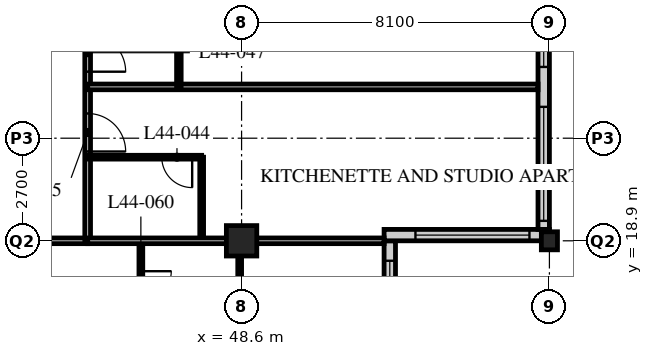
"""IFC4 building model, lengths in metres.
Left out: names, types, materials, properties, quantities, classifications, styles, units other than length and angle.
Written with IfcOpenShell. Run it as: python <this file> out.ifc"""

import sys

from ifc_helpers import new_model, si_unit, direction, frame, frame_2d, origin, origin_2d, place, context, subcontext, project, spatial, rectangle, hollow_rectangle, i_section, extrude, element, fill, save


model = new_model("IFC4")
c1 = context("Model", 3, precision=1e-05, world=origin(), true_north=direction((0.0, 1.0)))
c2 = subcontext(c1, "Body", "Model", "MODEL_VIEW")
j1 = project(units=[si_unit("LENGTHUNIT", "METRE"), si_unit("PLANEANGLEUNIT", "RADIAN")], contexts=[c1])
p1 = place(None, origin())
s1 = spatial("IfcSite", under=j1, at=p1, CompositionType="ELEMENT")
p2 = place(p1, origin())
s2 = spatial("IfcBuilding", under=s1, at=p2, CompositionType="ELEMENT")
p3 = place(p2, frame((0.0, 0.0, 174.0)))
s3 = spatial("IfcBuildingStorey", under=s2, at=p3, CompositionType="ELEMENT", Elevation=174.0)
p4 = place(p3, frame((48.6, 18.9, 0.0), z_axis=(0.0, 0.0, 1.0), x_axis=(1.0, 0.0, 0.0)))
e1 = element("IfcColumn", 1, at=p4, inside=s3, PredefinedType="COLUMN", context=c2, shape_type="SweptSolid", body=[
    extrude(hollow_rectangle(XDim=0.8, YDim=0.8, WallThickness=0.08, at=origin_2d()), origin(), (0.0, 0.0, 1.0), 3.6),
])
p5 = place(p3, frame((56.7, 18.9, 0.0), z_axis=(0.0, 0.0, 1.0), x_axis=(1.0, 0.0, 0.0)))
e2 = element("IfcColumn", 2, at=p5, inside=s3, PredefinedType="COLUMN", context=c2, shape_type="SweptSolid", body=[
    extrude(i_section(OverallWidth=0.424, OverallDepth=0.475, WebThickness=0.048, FlangeThickness=0.077, FilletRadius=0.015, at=origin_2d()), origin(), (0.0, 0.0, 1.0), 3.6),
])
p6 = place(p3, frame((52.5, 15.15, 0.0), z_axis=(0.0, 0.0, 1.0), x_axis=(0.0, 1.0, 0.0)))
e3 = element("IfcWall", 3, at=p6, inside=s3, PredefinedType="SOLIDWALL", context=c2, shape_type="SweptSolid", body=[
    extrude(rectangle(XDim=3.75, YDim=0.3, at=frame_2d((1.875, 0.0))), origin(), (0.0, 0.0, 1.0), 3.39),
])
p7 = place(p6, frame((0.225, 0.0, 0.6)))
e4 = element("IfcOpeningElement", 4, at=p7, cuts=e3, PredefinedType="OPENING", context=c2, shape_type="SweptSolid", body=[
    extrude(rectangle(XDim=3.0, YDim=2.0, at=frame_2d((1.5, 1.0))), frame((0.0, 0.16, 0.0), z_axis=(0.0, -1.0, 0.0), x_axis=(1.0, 0.0, 0.0)), (0.0, 0.0, 1.0), 0.32),
])
p8 = place(p3, frame((52.35, 19.05, 0.0), z_axis=(0.0, 0.0, 1.0), x_axis=(1.0, 0.0, 0.0)))
e5 = element("IfcWall", 5, at=p8, inside=s3, PredefinedType="SOLIDWALL", context=c2, shape_type="SweptSolid", body=[
    extrude(rectangle(XDim=4.35, YDim=0.3, at=frame_2d((2.175, 0.0))), origin(), (0.0, 0.0, 1.0), 3.39),
])
p9 = place(p8, frame((0.825, 0.0, 0.6)))
e6 = element("IfcOpeningElement", 6, at=p9, cuts=e5, PredefinedType="OPENING", context=c2, shape_type="SweptSolid", body=[
    extrude(rectangle(XDim=3.0, YDim=2.0, at=frame_2d((1.5, 1.0))), frame((0.0, 0.16, 0.0), z_axis=(0.0, -1.0, 0.0), x_axis=(1.0, 0.0, 0.0)), (0.0, 0.0, 1.0), 0.32),
])
p10 = place(p3, frame((56.55, 19.2, 0.0), z_axis=(0.0, 0.0, 1.0), x_axis=(0.0, 1.0, 0.0)))
e7 = element("IfcWall", 7, at=p10, inside=s3, PredefinedType="SOLIDWALL", context=c2, shape_type="SweptSolid", body=[
    extrude(rectangle(XDim=32.1, YDim=0.3, at=frame_2d((16.05, 0.0))), origin(), (0.0, 0.0, 1.0), 3.39),
])
p11 = place(p10, frame((0.225, 0.0, 0.6)))
e8 = element("IfcOpeningElement", 8, at=p11, cuts=e7, PredefinedType="OPENING", context=c2, shape_type="SweptSolid", body=[
    extrude(rectangle(XDim=3.0, YDim=2.4, at=frame_2d((1.5, 1.2))), frame((0.0, 0.16, 0.0), z_axis=(0.0, -1.0, 0.0), x_axis=(1.0, 0.0, 0.0)), (0.0, 0.0, 1.0), 0.32),
])
p12 = place(p10, frame((4.275, 0.0, 0.6)))
e9 = element("IfcOpeningElement", 9, at=p12, cuts=e7, PredefinedType="OPENING", context=c2, shape_type="SweptSolid", body=[
    extrude(rectangle(XDim=3.0, YDim=2.4, at=frame_2d((1.5, 1.2))), frame((0.0, 0.16, 0.0), z_axis=(0.0, -1.0, 0.0), x_axis=(1.0, 0.0, 0.0)), (0.0, 0.0, 1.0), 0.32),
])
p13 = place(p10, frame((8.325, 0.0, 0.6)))
e10 = element("IfcOpeningElement", 10, at=p13, cuts=e7, PredefinedType="OPENING", context=c2, shape_type="SweptSolid", body=[
    extrude(rectangle(XDim=3.0, YDim=2.4, at=frame_2d((1.5, 1.2))), frame((0.0, 0.16, 0.0), z_axis=(0.0, -1.0, 0.0), x_axis=(1.0, 0.0, 0.0)), (0.0, 0.0, 1.0), 0.32),
])
p14 = place(p10, frame((12.375, 0.0, 0.6)))
e11 = element("IfcOpeningElement", 11, at=p14, cuts=e7, PredefinedType="OPENING", context=c2, shape_type="SweptSolid", body=[
    extrude(rectangle(XDim=3.0, YDim=2.4, at=frame_2d((1.5, 1.2))), frame((0.0, 0.16, 0.0), z_axis=(0.0, -1.0, 0.0), x_axis=(1.0, 0.0, 0.0)), (0.0, 0.0, 1.0), 0.32),
])
p15 = place(p10, frame((16.425, 0.0, 0.6)))
e12 = element("IfcOpeningElement", 12, at=p15, cuts=e7, PredefinedType="OPENING", context=c2, shape_type="SweptSolid", body=[
    extrude(rectangle(XDim=3.0, YDim=2.4, at=frame_2d((1.5, 1.2))), frame((0.0, 0.16, 0.0), z_axis=(0.0, -1.0, 0.0), x_axis=(1.0, 0.0, 0.0)), (0.0, 0.0, 1.0), 0.32),
])
p16 = place(p10, frame((20.475, 0.0, 0.6)))
e13 = element("IfcOpeningElement", 13, at=p16, cuts=e7, PredefinedType="OPENING", context=c2, shape_type="SweptSolid", body=[
    extrude(rectangle(XDim=3.0, YDim=2.4, at=frame_2d((1.5, 1.2))), frame((0.0, 0.16, 0.0), z_axis=(0.0, -1.0, 0.0), x_axis=(1.0, 0.0, 0.0)), (0.0, 0.0, 1.0), 0.32),
])
p17 = place(p10, frame((24.525, 0.0, 0.6)))
e14 = element("IfcOpeningElement", 14, at=p17, cuts=e7, PredefinedType="OPENING", context=c2, shape_type="SweptSolid", body=[
    extrude(rectangle(XDim=3.0, YDim=2.4, at=frame_2d((1.5, 1.2))), frame((0.0, 0.16, 0.0), z_axis=(0.0, -1.0, 0.0), x_axis=(1.0, 0.0, 0.0)), (0.0, 0.0, 1.0), 0.32),
])
p18 = place(p10, frame((28.575, 0.0, 0.6)))
e15 = element("IfcOpeningElement", 15, at=p18, cuts=e7, PredefinedType="OPENING", context=c2, shape_type="SweptSolid", body=[
    extrude(rectangle(XDim=3.0, YDim=2.4, at=frame_2d((1.5, 1.2))), frame((0.0, 0.16, 0.0), z_axis=(0.0, -1.0, 0.0), x_axis=(1.0, 0.0, 0.0)), (0.0, 0.0, 1.0), 0.32),
])
p19 = place(p3, frame((12.15, 18.9, 0.0), z_axis=(0.0, 0.0, 1.0), x_axis=(1.0, 0.0, 0.0)))
e16 = element("IfcWall", 16, at=p19, inside=s3, PredefinedType="PARTITIONING", context=c2, shape_type="SweptSolid", body=[
    extrude(rectangle(XDim=32.4, YDim=0.15, at=frame_2d((16.2, 0.0))), origin(), (0.0, 0.0, 1.0), 2.778),
])
p20 = place(p19, frame((6.4, 0.0, 0.0)))
e17 = element("IfcOpeningElement", 17, at=p20, cuts=e16, PredefinedType="OPENING", context=c2, shape_type="SweptSolid", body=[
    extrude(rectangle(XDim=1.0, YDim=2.1, at=frame_2d((0.5, 1.05))), frame((0.0, 0.085, 0.0), z_axis=(0.0, -1.0, 0.0), x_axis=(1.0, 0.0, 0.0)), (0.0, 0.0, 1.0), 0.17),
])
p21 = place(p19, frame((8.8, 0.0, 0.0)))
e18 = element("IfcOpeningElement", 18, at=p21, cuts=e16, PredefinedType="OPENING", context=c2, shape_type="SweptSolid", body=[
    extrude(rectangle(XDim=1.0, YDim=2.1, at=frame_2d((0.5, 1.05))), frame((0.0, 0.085, 0.0), z_axis=(0.0, -1.0, 0.0), x_axis=(1.0, 0.0, 0.0)), (0.0, 0.0, 1.0), 0.17),
])
p22 = place(p19, frame((13.05, 0.0, 0.0)))
e19 = element("IfcOpeningElement", 19, at=p22, cuts=e16, PredefinedType="OPENING", context=c2, shape_type="SweptSolid", body=[
    extrude(rectangle(XDim=1.0, YDim=2.1, at=frame_2d((0.5, 1.05))), frame((0.0, 0.085, 0.0), z_axis=(0.0, -1.0, 0.0), x_axis=(1.0, 0.0, 0.0)), (0.0, 0.0, 1.0), 0.17),
])
p23 = place(p19, frame((22.6, 0.0, 0.0)))
e20 = element("IfcOpeningElement", 20, at=p23, cuts=e16, PredefinedType="OPENING", context=c2, shape_type="SweptSolid", body=[
    extrude(rectangle(XDim=1.0, YDim=2.1, at=frame_2d((0.5, 1.05))), frame((0.0, 0.085, 0.0), z_axis=(0.0, -1.0, 0.0), x_axis=(1.0, 0.0, 0.0)), (0.0, 0.0, 1.0), 0.17),
])
p24 = place(p19, frame((25.0, 0.0, 0.0)))
e21 = element("IfcOpeningElement", 21, at=p24, cuts=e16, PredefinedType="OPENING", context=c2, shape_type="SweptSolid", body=[
    extrude(rectangle(XDim=1.0, YDim=2.1, at=frame_2d((0.5, 1.05))), frame((0.0, 0.085, 0.0), z_axis=(0.0, -1.0, 0.0), x_axis=(1.0, 0.0, 0.0)), (0.0, 0.0, 1.0), 0.17),
])
p25 = place(p19, frame((1.525, 0.0, 0.0)))
e22 = element("IfcOpeningElement", 22, at=p25, cuts=e16, PredefinedType="OPENING", context=c2, shape_type="SweptSolid", body=[
    extrude(rectangle(XDim=1.0, YDim=2.1, at=frame_2d((0.5, 1.05))), frame((0.0, 0.085, 0.0), z_axis=(0.0, -1.0, 0.0), x_axis=(1.0, 0.0, 0.0)), (0.0, 0.0, 1.0), 0.17),
])
p26 = place(p19, frame((29.875, 0.0, 0.0)))
e23 = element("IfcOpeningElement", 23, at=p26, cuts=e16, PredefinedType="OPENING", context=c2, shape_type="SweptSolid", body=[
    extrude(rectangle(XDim=1.0, YDim=2.1, at=frame_2d((0.5, 1.05))), frame((0.0, 0.085, 0.0), z_axis=(0.0, -1.0, 0.0), x_axis=(1.0, 0.0, 0.0)), (0.0, 0.0, 1.0), 0.17),
])
p27 = place(p3, frame((44.55, 18.9, 0.0), z_axis=(0.0, 0.0, 1.0), x_axis=(0.0, 1.0, 0.0)))
e24 = element("IfcWall", 24, at=p27, inside=s3, PredefinedType="PARTITIONING", context=c2, shape_type="SweptSolid", body=[
    extrude(rectangle(XDim=24.3, YDim=0.15, at=frame_2d((12.15, 0.0))), origin(), (0.0, 0.0, 1.0), 3.39),
])
p28 = place(p27, frame((2.35, 0.0, 0.0)))
e25 = element("IfcOpeningElement", 25, at=p28, cuts=e24, PredefinedType="OPENING", context=c2, shape_type="SweptSolid", body=[
    extrude(rectangle(XDim=1.0, YDim=2.1, at=frame_2d((0.5, 1.05))), frame((0.0, 0.085, 0.0), z_axis=(0.0, -1.0, 0.0), x_axis=(1.0, 0.0, 0.0)), (0.0, 0.0, 1.0), 0.17),
])
p29 = place(p27, frame((4.45, 0.0, 0.0)))
e26 = element("IfcOpeningElement", 26, at=p29, cuts=e24, PredefinedType="OPENING", context=c2, shape_type="SweptSolid", body=[
    extrude(rectangle(XDim=1.0, YDim=2.1, at=frame_2d((0.5, 1.05))), frame((0.0, 0.085, 0.0), z_axis=(0.0, -1.0, 0.0), x_axis=(1.0, 0.0, 0.0)), (0.0, 0.0, 1.0), 0.17),
])
p30 = place(p27, frame((18.55, 0.0, 0.0)))
e27 = element("IfcOpeningElement", 27, at=p30, cuts=e24, PredefinedType="OPENING", context=c2, shape_type="SweptSolid", body=[
    extrude(rectangle(XDim=1.0, YDim=2.1, at=frame_2d((0.5, 1.05))), frame((0.0, 0.085, 0.0), z_axis=(0.0, -1.0, 0.0), x_axis=(1.0, 0.0, 0.0)), (0.0, 0.0, 1.0), 0.17),
])
p31 = place(p27, frame((22.6, 0.0, 0.0)))
e28 = element("IfcOpeningElement", 28, at=p31, cuts=e24, PredefinedType="OPENING", context=c2, shape_type="SweptSolid", body=[
    extrude(rectangle(XDim=1.0, YDim=2.1, at=frame_2d((0.5, 1.05))), frame((0.0, 0.085, 0.0), z_axis=(0.0, -1.0, 0.0), x_axis=(1.0, 0.0, 0.0)), (0.0, 0.0, 1.0), 0.17),
])
p32 = place(p3, frame((47.55, 18.9, 0.0), z_axis=(0.0, 0.0, 1.0), x_axis=(0.0, 1.0, 0.0)))
e29 = element("IfcWall", 29, at=p32, inside=s3, PredefinedType="PARTITIONING", context=c2, shape_type="SweptSolid", body=[
    extrude(rectangle(XDim=2.2, YDim=0.1, at=frame_2d((1.1, 0.0))), origin(), (0.0, 0.0, 1.0), 3.39),
])
p33 = place(p3, frame((44.55, 21.1, 0.0), z_axis=(0.0, 0.0, 1.0), x_axis=(1.0, 0.0, 0.0)))
e30 = element("IfcWall", 30, at=p33, inside=s3, PredefinedType="PARTITIONING", context=c2, shape_type="SweptSolid", body=[
    extrude(rectangle(XDim=3.0, YDim=0.1, at=frame_2d((1.5, 0.0))), origin(), (0.0, 0.0, 1.0), 3.39),
])
p34 = place(p33, frame((1.95, 0.0, 0.0)))
e31 = element("IfcOpeningElement", 31, at=p34, cuts=e30, PredefinedType="OPENING", context=c2, shape_type="SweptSolid", body=[
    extrude(rectangle(XDim=0.8, YDim=2.1, at=frame_2d((0.4, 1.05))), frame((0.0, 0.06, 0.0), z_axis=(0.0, -1.0, 0.0), x_axis=(1.0, 0.0, 0.0)), (0.0, 0.0, 1.0), 0.12),
])
p35 = place(p3, frame((44.55, 22.95, 0.0), z_axis=(0.0, 0.0, 1.0), x_axis=(1.0, 0.0, 0.0)))
e32 = element("IfcWall", 32, at=p35, inside=s3, PredefinedType="PARTITIONING", context=c2, shape_type="SweptSolid", body=[
    extrude(rectangle(XDim=11.85, YDim=0.15, at=frame_2d((5.925, 0.0))), origin(), (0.0, 0.0, 1.0), 3.39),
])
p36 = place(p3, frame((46.95, 22.95, 0.0), z_axis=(0.0, 0.0, 1.0), x_axis=(0.0, 1.0, 0.0)))
e33 = element("IfcWall", 33, at=p36, inside=s3, PredefinedType="PARTITIONING", context=c2, shape_type="SweptSolid", body=[
    extrude(rectangle(XDim=12.15, YDim=0.12, at=frame_2d((6.075, 0.0))), origin(), (0.0, 0.0, 1.0), 3.39),
])
p37 = place(p36, frame((0.975, 0.0, 0.0)))
e34 = element("IfcOpeningElement", 34, at=p37, cuts=e33, PredefinedType="OPENING", context=c2, shape_type="SweptSolid", body=[
    extrude(rectangle(XDim=0.85, YDim=2.1, at=frame_2d((0.425, 1.05))), frame((0.0, 0.07, 0.0), z_axis=(0.0, -1.0, 0.0), x_axis=(1.0, 0.0, 0.0)), (0.0, 0.0, 1.0), 0.14),
])
p38 = place(p36, frame((8.425, 0.0, 0.0)))
e35 = element("IfcOpeningElement", 35, at=p38, cuts=e33, PredefinedType="OPENING", context=c2, shape_type="SweptSolid", body=[
    extrude(rectangle(XDim=0.85, YDim=2.1, at=frame_2d((0.425, 1.05))), frame((0.0, 0.07, 0.0), z_axis=(0.0, -1.0, 0.0), x_axis=(1.0, 0.0, 0.0)), (0.0, 0.0, 1.0), 0.14),
])
p39 = place(p3, frame((45.95, 18.9, 0.0), z_axis=(0.0, 0.0, 1.0), x_axis=(0.0, -1.0, 0.0)))
e36 = element("IfcWall", 36, at=p39, inside=s3, PredefinedType="PARTITIONING", context=c2, shape_type="SweptSolid", body=[
    extrude(rectangle(XDim=2.4, YDim=0.1, at=frame_2d((1.2, 0.0))), origin(), (0.0, 0.0, 1.0), 3.39),
])
p40 = place(p39, frame((0.8, 0.0, 0.0)))
e37 = element("IfcOpeningElement", 37, at=p40, cuts=e36, PredefinedType="OPENING", context=c2, shape_type="SweptSolid", body=[
    extrude(rectangle(XDim=0.8, YDim=2.1, at=frame_2d((0.4, 1.05))), frame((0.0, 0.06, 0.0), z_axis=(0.0, -1.0, 0.0), x_axis=(1.0, 0.0, 0.0)), (0.0, 0.0, 1.0), 0.12),
])
p41 = place(p3, frame((48.55, 18.9, 0.0), z_axis=(0.0, 0.0, 1.0), x_axis=(0.0, -1.0, 0.0)))
e38 = element("IfcWall", 38, at=p41, inside=s3, PredefinedType="PARTITIONING", context=c2, shape_type="SweptSolid", body=[
    extrude(rectangle(XDim=2.4, YDim=0.1, at=frame_2d((1.2, 0.0))), origin(), (0.0, 0.0, 1.0), 2.778),
])
p42 = place(p3, frame((44.55, 18.9, 0.0), z_axis=(0.0, 0.0, 1.0), x_axis=(1.0, 0.0, 0.0)))
e39 = element("IfcWall", 39, at=p42, inside=s3, PredefinedType="PARTITIONING", context=c2, shape_type="SweptSolid", body=[
    extrude(rectangle(XDim=7.8, YDim=0.15, at=frame_2d((3.9, 0.0))), origin(), (0.0, 0.0, 1.0), 2.778),
])
p43 = place(p7, origin())
e40 = element("IfcWindow", 40, at=p43, inside=s3, PartitioningType="SINGLE_PANEL", PredefinedType="WINDOW", context=c2, shape_type="SweptSolid", body=[
    extrude(rectangle(XDim=3.0, YDim=2.0, at=frame_2d((1.5, 1.0))), frame((0.0, 0.03, 0.0), z_axis=(0.0, -1.0, 0.0), x_axis=(1.0, 0.0, 0.0)), (0.0, 0.0, 1.0), 0.06),
])
fill(e4, e40)
p44 = place(p9, origin())
e41 = element("IfcWindow", 41, at=p44, inside=s3, PartitioningType="SINGLE_PANEL", PredefinedType="WINDOW", context=c2, shape_type="SweptSolid", body=[
    extrude(rectangle(XDim=3.0, YDim=2.0, at=frame_2d((1.5, 1.0))), frame((0.0, 0.03, 0.0), z_axis=(0.0, -1.0, 0.0), x_axis=(1.0, 0.0, 0.0)), (0.0, 0.0, 1.0), 0.06),
])
fill(e6, e41)
p45 = place(p11, origin())
e42 = element("IfcWindow", 42, at=p45, inside=s3, PartitioningType="SINGLE_PANEL", PredefinedType="WINDOW", context=c2, shape_type="SweptSolid", body=[
    extrude(rectangle(XDim=3.0, YDim=2.4, at=frame_2d((1.5, 1.2))), frame((0.0, 0.03, 0.0), z_axis=(0.0, -1.0, 0.0), x_axis=(1.0, 0.0, 0.0)), (0.0, 0.0, 1.0), 0.06),
])
fill(e8, e42)
p46 = place(p12, origin())
e43 = element("IfcWindow", 43, at=p46, inside=s3, PartitioningType="SINGLE_PANEL", PredefinedType="WINDOW", context=c2, shape_type="SweptSolid", body=[
    extrude(rectangle(XDim=3.0, YDim=2.4, at=frame_2d((1.5, 1.2))), frame((0.0, 0.03, 0.0), z_axis=(0.0, -1.0, 0.0), x_axis=(1.0, 0.0, 0.0)), (0.0, 0.0, 1.0), 0.06),
])
fill(e9, e43)
p47 = place(p34, origin())
e44 = element("IfcDoor", 44, at=p47, inside=s3, OperationType="SINGLE_SWING_LEFT", PredefinedType="DOOR", context=c2, shape_type="SweptSolid", body=[
    extrude(rectangle(XDim=0.8, YDim=2.1, at=frame_2d((0.4, 1.05))), frame((0.0, 0.025, 0.0), z_axis=(0.0, -1.0, 0.0), x_axis=(1.0, 0.0, 0.0)), (0.0, 0.0, 1.0), 0.05),
])
fill(e31, e44)
p48 = place(p28, origin())
e45 = element("IfcDoor", 45, at=p48, inside=s3, OperationType="SINGLE_SWING_RIGHT", PredefinedType="DOOR", context=c2, shape_type="SweptSolid", body=[
    extrude(rectangle(XDim=1.0, YDim=2.1, at=frame_2d((0.5, 1.05))), frame((0.0, 0.025, 0.0), z_axis=(0.0, -1.0, 0.0), x_axis=(1.0, 0.0, 0.0)), (0.0, 0.0, 1.0), 0.05),
])
fill(e25, e45)
p49 = place(p29, origin())
e46 = element("IfcDoor", 46, at=p49, inside=s3, OperationType="SINGLE_SWING_RIGHT", PredefinedType="DOOR", context=c2, shape_type="SweptSolid", body=[
    extrude(rectangle(XDim=1.0, YDim=2.1, at=frame_2d((0.5, 1.05))), frame((0.0, 0.025, 0.0), z_axis=(0.0, -1.0, 0.0), x_axis=(1.0, 0.0, 0.0)), (0.0, 0.0, 1.0), 0.05),
])
fill(e26, e46)
p50 = place(p40, origin())
e47 = element("IfcDoor", 47, at=p50, inside=s3, OperationType="SINGLE_SWING_LEFT", PredefinedType="DOOR", context=c2, shape_type="SweptSolid", body=[
    extrude(rectangle(XDim=0.8, YDim=2.1, at=frame_2d((0.4, 1.05))), frame((0.0, 0.025, 0.0), z_axis=(0.0, -1.0, 0.0), x_axis=(1.0, 0.0, 0.0)), (0.0, 0.0, 1.0), 0.05),
])
fill(e37, e47)
save(model, sys.argv[1])
